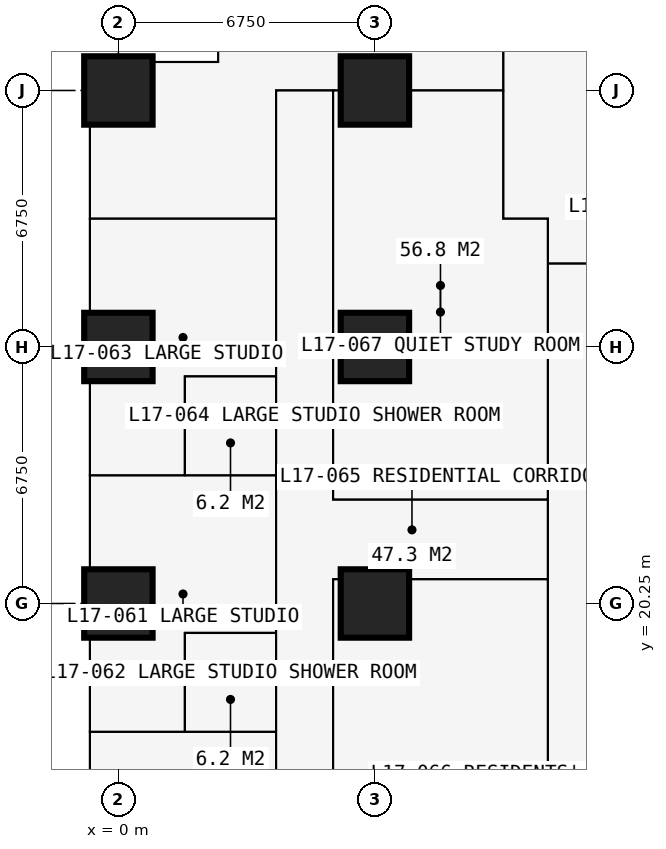
"""IFC4 building model, lengths in metres.
Left out: names, types, materials, properties, quantities, classifications, styles, units other than length and angle.
Written with IfcOpenShell. Run it as: python <this file> out.ifc"""

import sys

from ifc_helpers import new_model, si_unit, direction, frame, frame_2d, origin, origin_2d, place, context, subcontext, project, spatial, rectangle, extrude, element, fill, save


model = new_model("IFC4")
c1 = context("Model", 3, precision=1e-05, world=origin(), true_north=direction((0.0, 1.0)))
c2 = subcontext(c1, "Body", "Model", "MODEL_VIEW")
j1 = project(units=[si_unit("LENGTHUNIT", "METRE"), si_unit("PLANEANGLEUNIT", "RADIAN")], contexts=[c1])
p1 = place(None, origin())
s1 = spatial("IfcSite", under=j1, at=p1, CompositionType="ELEMENT")
p2 = place(p1, origin())
s2 = spatial("IfcBuilding", under=s1, at=p2, CompositionType="ELEMENT")
p3 = place(p2, frame((0.0, 0.0, 64.8)))
s3 = spatial("IfcBuildingStorey", under=s2, at=p3, CompositionType="ELEMENT", Elevation=64.8)
for number, where, z_axis, x_axis in (
    (1, (0.0, 20.25, 0.0), (0.0, 0.0, 1.0), (1.0, 0.0, 0.0)),
    (2, (0.0, 27.0, 0.0), (0.0, 0.0, 1.0), (1.0, 0.0, 0.0)),
    (3, (0.0, 33.75, 0.0), (0.0, 0.0, 1.0), (1.0, 0.0, 0.0)),
    (4, (6.75, 20.25, 0.0), (0.0, 0.0, 1.0), (1.0, 0.0, 0.0)),
    (5, (6.75, 27.0, 0.0), (0.0, 0.0, 1.0), (1.0, 0.0, 0.0)),
    (6, (6.75, 33.75, 0.0), (0.0, 0.0, 1.0), (1.0, 0.0, 0.0)),
):
    element("IfcColumn", number, at=place(p3, frame(where, z_axis=z_axis, x_axis=x_axis)), inside=s3, PredefinedType="COLUMN", context=c2, shape_type="SweptSolid", body=[
        extrude(rectangle(XDim=1.8, YDim=1.8, at=origin_2d()), origin(), (0.0, 0.0, 1.0), 3.6),
    ])
p4 = place(p3, frame((2.625, 37.875, 0.0), z_axis=(0.0, 0.0, 1.0), x_axis=(0.0, -1.0, 0.0)))
e7 = element("IfcWall", 7, at=p4, inside=s3, PredefinedType="SOLIDWALL", context=c2, shape_type="SweptSolid", body=[
    extrude(rectangle(XDim=3.375, YDim=0.3, at=frame_2d((1.688, 0.0))), origin(), (0.0, 0.0, 1.0), 3.375),
])
p5 = place(p4, frame((0.788, 0.0, 0.6)))
e8 = element("IfcOpeningElement", 8, at=p5, cuts=e7, PredefinedType="OPENING", context=c2, shape_type="SweptSolid", body=[
    extrude(rectangle(XDim=1.8, YDim=2.1, at=frame_2d((0.9, 1.05))), frame((0.0, 0.16, 0.0), z_axis=(0.0, -1.0, 0.0), x_axis=(1.0, 0.0, 0.0)), (0.0, 0.0, 1.0), 0.32),
])
p6 = place(p3, frame((2.625, 34.5, 0.0), z_axis=(0.0, 0.0, 1.0), x_axis=(-1.0, 0.0, 0.0)))
e9 = element("IfcWall", 9, at=p6, inside=s3, PredefinedType="SOLIDWALL", context=c2, shape_type="SweptSolid", body=[
    extrude(rectangle(XDim=3.375, YDim=0.3, at=frame_2d((1.688, 0.0))), origin(), (0.0, 0.0, 1.0), 3.375),
])
p7 = place(p6, frame((0.343, 0.0, 0.9)))
e10 = element("IfcOpeningElement", 10, at=p7, cuts=e9, PredefinedType="OPENING", context=c2, shape_type="SweptSolid", body=[
    extrude(rectangle(XDim=1.2, YDim=1.8, at=frame_2d((0.6, 0.9))), frame((0.0, 0.16, 0.0), z_axis=(0.0, -1.0, 0.0), x_axis=(1.0, 0.0, 0.0)), (0.0, 0.0, 1.0), 0.32),
])
p8 = place(p3, frame((-0.75, 20.25, 0.0), z_axis=(0.0, 0.0, 1.0), x_axis=(0.0, 1.0, 0.0)))
e11 = element("IfcWall", 11, at=p8, inside=s3, PredefinedType="SOLIDWALL", context=c2, shape_type="SweptSolid", body=[
    extrude(rectangle(XDim=6.75, YDim=0.15, at=frame_2d((3.375, 0.0))), origin(), (0.0, 0.0, 1.0), 3.375),
])
p9 = place(p8, frame((0.962, 0.0, 0.0)))
e12 = element("IfcOpeningElement", 12, at=p9, cuts=e11, PredefinedType="OPENING", context=c2, shape_type="SweptSolid", body=[
    extrude(rectangle(XDim=1.0, YDim=2.2, at=frame_2d((0.5, 1.1))), frame((0.0, 0.085, 0.0), z_axis=(0.0, -1.0, 0.0), x_axis=(1.0, 0.0, 0.0)), (0.0, 0.0, 1.0), 0.17),
])
p10 = place(p8, frame((2.025, 0.0, 0.9)))
e13 = element("IfcOpeningElement", 13, at=p10, cuts=e11, PredefinedType="OPENING", context=c2, shape_type="SweptSolid", body=[
    extrude(rectangle(XDim=1.2, YDim=1.8, at=frame_2d((0.6, 0.9))), frame((0.0, 0.085, 0.0), z_axis=(0.0, -1.0, 0.0), x_axis=(1.0, 0.0, 0.0)), (0.0, 0.0, 1.0), 0.17),
])
p11 = place(p8, frame((4.788, 0.0, 0.0)))
e14 = element("IfcOpeningElement", 14, at=p11, cuts=e11, PredefinedType="OPENING", context=c2, shape_type="SweptSolid", body=[
    extrude(rectangle(XDim=1.0, YDim=2.2, at=frame_2d((0.5, 1.1))), frame((0.0, 0.085, 0.0), z_axis=(0.0, -1.0, 0.0), x_axis=(1.0, 0.0, 0.0)), (0.0, 0.0, 1.0), 0.17),
])
p12 = place(p8, frame((3.525, 0.0, 0.9)))
e15 = element("IfcOpeningElement", 15, at=p12, cuts=e11, PredefinedType="OPENING", context=c2, shape_type="SweptSolid", body=[
    extrude(rectangle(XDim=1.2, YDim=1.8, at=frame_2d((0.6, 0.9))), frame((0.0, 0.085, 0.0), z_axis=(0.0, -1.0, 0.0), x_axis=(1.0, 0.0, 0.0)), (0.0, 0.0, 1.0), 0.17),
])
p13 = place(p3, frame((-0.85, 23.625, 0.0), z_axis=(0.0, 0.0, 1.0), x_axis=(-1.0, 0.0, 0.0)))
e16 = element("IfcWall", 16, at=p13, inside=s3, PredefinedType="USERDEFINED", context=c2, shape_type="SweptSolid", body=[
    extrude(rectangle(XDim=2.2, YDim=1.0, at=frame_2d((1.1, 0.0))), origin(), (0.0, 0.0, 1.0), 0.9),
])
p14 = place(p3, frame((-0.734, 16.875, 0.0), z_axis=(0.0, 0.0, 1.0), x_axis=(1.0, 0.0, 0.0)))
e17 = element("IfcWall", 17, at=p14, inside=s3, PredefinedType="PARTITIONING", context=c2, shape_type="SweptSolid", body=[
    extrude(rectangle(XDim=4.884, YDim=0.175, at=frame_2d((2.442, 0.0))), origin(), (0.0, 0.0, 1.0), 3.375),
])
p15 = place(p14, frame((3.234, 0.0, 0.0)))
e18 = element("IfcOpeningElement", 18, at=p15, cuts=e17, PredefinedType="OPENING", context=c2, shape_type="SweptSolid", body=[
    extrude(rectangle(XDim=0.9, YDim=2.2, at=frame_2d((0.45, 1.1))), frame((0.0, 0.097, 0.0), z_axis=(0.0, -1.0, 0.0), x_axis=(1.0, 0.0, 0.0)), (0.0, 0.0, 1.0), 0.195),
])
p16 = place(p3, frame((-0.734, 23.625, 0.0), z_axis=(0.0, 0.0, 1.0), x_axis=(1.0, 0.0, 0.0)))
e19 = element("IfcWall", 19, at=p16, inside=s3, PredefinedType="PARTITIONING", context=c2, shape_type="SweptSolid", body=[
    extrude(rectangle(XDim=4.884, YDim=0.175, at=frame_2d((2.442, 0.0))), origin(), (0.0, 0.0, 1.0), 3.375),
])
p17 = place(p16, frame((3.234, 0.0, 0.0)))
e20 = element("IfcOpeningElement", 20, at=p17, cuts=e19, PredefinedType="OPENING", context=c2, shape_type="SweptSolid", body=[
    extrude(rectangle(XDim=0.9, YDim=2.2, at=frame_2d((0.45, 1.1))), frame((0.0, 0.097, 0.0), z_axis=(0.0, -1.0, 0.0), x_axis=(1.0, 0.0, 0.0)), (0.0, 0.0, 1.0), 0.195),
])
p18 = place(p3, frame((-0.734, 30.375, 0.0), z_axis=(0.0, 0.0, 1.0), x_axis=(1.0, 0.0, 0.0)))
e21 = element("IfcWall", 21, at=p18, inside=s3, PredefinedType="PARTITIONING", context=c2, shape_type="SweptSolid", body=[
    extrude(rectangle(XDim=4.884, YDim=0.15, at=frame_2d((2.442, 0.0))), origin(), (0.0, 0.0, 1.0), 3.375),
])
p19 = place(p3, frame((1.75, 16.875, 0.0), z_axis=(0.0, 0.0, 1.0), x_axis=(0.0, 1.0, 0.0)))
e22 = element("IfcWall", 22, at=p19, inside=s3, PredefinedType="PARTITIONING", context=c2, shape_type="SweptSolid", body=[
    extrude(rectangle(XDim=2.6, YDim=0.1, at=frame_2d((1.3, 0.0))), origin(), (0.0, 0.0, 1.0), 3.375),
])
p20 = place(p3, frame((1.75, 19.475, 0.0), z_axis=(0.0, 0.0, 1.0), x_axis=(1.0, 0.0, 0.0)))
e23 = element("IfcWall", 23, at=p20, inside=s3, PredefinedType="PARTITIONING", context=c2, shape_type="SweptSolid", body=[
    extrude(rectangle(XDim=2.4, YDim=0.1, at=frame_2d((1.2, 0.0))), origin(), (0.0, 0.0, 1.0), 3.375),
])
p21 = place(p3, frame((1.75, 23.625, 0.0), z_axis=(0.0, 0.0, 1.0), x_axis=(0.0, 1.0, 0.0)))
e24 = element("IfcWall", 24, at=p21, inside=s3, PredefinedType="PARTITIONING", context=c2, shape_type="SweptSolid", body=[
    extrude(rectangle(XDim=2.6, YDim=0.1, at=frame_2d((1.3, 0.0))), origin(), (0.0, 0.0, 1.0), 3.375),
])
p22 = place(p3, frame((1.75, 26.225, 0.0), z_axis=(0.0, 0.0, 1.0), x_axis=(1.0, 0.0, 0.0)))
e25 = element("IfcWall", 25, at=p22, inside=s3, PredefinedType="PARTITIONING", context=c2, shape_type="SweptSolid", body=[
    extrude(rectangle(XDim=2.4, YDim=0.1, at=frame_2d((1.2, 0.0))), origin(), (0.0, 0.0, 1.0), 3.375),
])
p23 = place(p3, frame((4.15, 10.125, 0.0), z_axis=(0.0, 0.0, 1.0), x_axis=(0.0, 1.0, 0.0)))
e26 = element("IfcWall", 26, at=p23, inside=s3, PredefinedType="PARTITIONING", context=c2, shape_type="SweptSolid", body=[
    extrude(rectangle(XDim=23.625, YDim=0.15, at=frame_2d((11.812, 0.0))), origin(), (0.0, 0.0, 1.0), 3.375),
])
p24 = place(p23, frame((4.2, 0.0, 0.0)))
e27 = element("IfcOpeningElement", 27, at=p24, cuts=e26, PredefinedType="OPENING", context=c2, shape_type="SweptSolid", body=[
    extrude(rectangle(XDim=0.95, YDim=2.2, at=frame_2d((0.475, 1.1))), frame((0.0, 0.085, 0.0), z_axis=(0.0, -1.0, 0.0), x_axis=(1.0, 0.0, 0.0)), (0.0, 0.0, 1.0), 0.17),
])
p25 = place(p23, frame((10.95, 0.0, 0.0)))
e28 = element("IfcOpeningElement", 28, at=p25, cuts=e26, PredefinedType="OPENING", context=c2, shape_type="SweptSolid", body=[
    extrude(rectangle(XDim=0.95, YDim=2.2, at=frame_2d((0.475, 1.1))), frame((0.0, 0.085, 0.0), z_axis=(0.0, -1.0, 0.0), x_axis=(1.0, 0.0, 0.0)), (0.0, 0.0, 1.0), 0.17),
])
p26 = place(p23, frame((17.7, 0.0, 0.0)))
e29 = element("IfcOpeningElement", 29, at=p26, cuts=e26, PredefinedType="OPENING", context=c2, shape_type="SweptSolid", body=[
    extrude(rectangle(XDim=0.95, YDim=2.2, at=frame_2d((0.475, 1.1))), frame((0.0, 0.085, 0.0), z_axis=(0.0, -1.0, 0.0), x_axis=(1.0, 0.0, 0.0)), (0.0, 0.0, 1.0), 0.17),
])
p27 = place(p3, frame((4.15, 33.75, 0.0), z_axis=(0.0, 0.0, 1.0), x_axis=(1.0, 0.0, 0.0)))
e30 = element("IfcWall", 30, at=p27, inside=s3, PredefinedType="PARTITIONING", context=c2, shape_type="SweptSolid", body=[
    extrude(rectangle(XDim=5.975, YDim=0.15, at=frame_2d((2.988, 0.0))), origin(), (0.0, 0.0, 1.0), 2.877),
])
p28 = place(p3, frame((5.65, 10.125, 0.0), z_axis=(0.0, 0.0, 1.0), x_axis=(0.0, 1.0, 0.0)))
e31 = element("IfcWall", 31, at=p28, inside=s3, PredefinedType="PARTITIONING", context=c2, shape_type="SweptSolid", body=[
    extrude(rectangle(XDim=10.762, YDim=0.15, at=frame_2d((5.381, 0.0))), origin(), (0.0, 0.0, 1.0), 3.375),
])
p29 = place(p28, frame((4.9, 0.0, 0.0)))
e32 = element("IfcOpeningElement", 32, at=p29, cuts=e31, PredefinedType="OPENING", context=c2, shape_type="SweptSolid", body=[
    extrude(rectangle(XDim=0.95, YDim=2.2, at=frame_2d((0.475, 1.1))), frame((0.0, 0.085, 0.0), z_axis=(0.0, -1.0, 0.0), x_axis=(1.0, 0.0, 0.0)), (0.0, 0.0, 1.0), 0.17),
])
p30 = place(p3, frame((5.65, 20.887, 0.0), z_axis=(0.0, 0.0, 1.0), x_axis=(1.0, 0.0, 0.0)))
e33 = element("IfcWall", 33, at=p30, inside=s3, PredefinedType="PARTITIONING", context=c2, shape_type="SweptSolid", body=[
    extrude(rectangle(XDim=5.65, YDim=0.15, at=frame_2d((2.825, 0.0))), origin(), (0.0, 0.0, 1.0), 3.375),
])
p31 = place(p3, frame((5.65, 22.988, 0.0), z_axis=(0.0, 0.0, 1.0), x_axis=(0.0, 1.0, 0.0)))
e34 = element("IfcWall", 34, at=p31, inside=s3, PredefinedType="PARTITIONING", context=c2, shape_type="SweptSolid", body=[
    extrude(rectangle(XDim=10.762, YDim=0.15, at=frame_2d((5.381, 0.0))), origin(), (0.0, 0.0, 1.0), 3.375),
])
p32 = place(p31, frame((4.95, 0.0, 0.0)))
e35 = element("IfcOpeningElement", 35, at=p32, cuts=e34, PredefinedType="OPENING", context=c2, shape_type="SweptSolid", body=[
    extrude(rectangle(XDim=0.95, YDim=2.2, at=frame_2d((0.475, 1.1))), frame((0.0, 0.085, 0.0), z_axis=(0.0, -1.0, 0.0), x_axis=(1.0, 0.0, 0.0)), (0.0, 0.0, 1.0), 0.17),
])
p33 = place(p3, frame((5.65, 22.988, 0.0), z_axis=(0.0, 0.0, 1.0), x_axis=(1.0, 0.0, 0.0)))
e36 = element("IfcWall", 36, at=p33, inside=s3, PredefinedType="PARTITIONING", context=c2, shape_type="SweptSolid", body=[
    extrude(rectangle(XDim=5.65, YDim=0.15, at=frame_2d((2.825, 0.0))), origin(), (0.0, 0.0, 1.0), 3.375),
])
p34 = place(p3, frame((10.125, 30.375, 0.0), z_axis=(0.0, 0.0, 1.0), x_axis=(0.0, 1.0, 0.0)))
e37 = element("IfcWall", 37, at=p34, inside=s3, PredefinedType="PARTITIONING", context=c2, shape_type="SweptSolid", body=[
    extrude(rectangle(XDim=10.859, YDim=0.15, at=frame_2d((5.429, 0.0))), origin(), (0.0, 0.0, 1.0), 3.375),
])
p35 = place(p34, frame((4.725, 0.0, 0.0)))
e38 = element("IfcOpeningElement", 38, at=p35, cuts=e37, PredefinedType="OPENING", context=c2, shape_type="SweptSolid", body=[
    extrude(rectangle(XDim=1.0, YDim=2.2, at=frame_2d((0.5, 1.1))), frame((0.0, 0.085, 0.0), z_axis=(0.0, -1.0, 0.0), x_axis=(1.0, 0.0, 0.0)), (0.0, 0.0, 1.0), 0.17),
])
p36 = place(p3, frame((10.125, 30.375, 0.0), z_axis=(0.0, 0.0, 1.0), x_axis=(1.0, 0.0, 0.0)))
e39 = element("IfcWall", 39, at=p36, inside=s3, PredefinedType="PARTITIONING", context=c2, shape_type="SweptSolid", body=[
    extrude(rectangle(XDim=1.175, YDim=0.15, at=frame_2d((0.587, 0.0))), origin(), (0.0, 0.0, 1.0), 3.375),
])
p37 = place(p3, frame((11.3, 11.3, 0.0), z_axis=(0.0, 0.0, 1.0), x_axis=(0.0, 1.0, 0.0)))
e40 = element("IfcWall", 40, at=p37, inside=s3, PredefinedType="PARTITIONING", context=c2, shape_type="SweptSolid", body=[
    extrude(rectangle(XDim=19.075, YDim=0.15, at=frame_2d((9.538, 0.0))), origin(), (0.0, 0.0, 1.0), 3.375),
])
p38 = place(p37, frame((10.137, 0.0, 0.0)))
e41 = element("IfcOpeningElement", 41, at=p38, cuts=e40, PredefinedType="OPENING", context=c2, shape_type="SweptSolid", body=[
    extrude(rectangle(XDim=1.0, YDim=2.2, at=frame_2d((0.5, 1.1))), frame((0.0, 0.085, 0.0), z_axis=(0.0, -1.0, 0.0), x_axis=(1.0, 0.0, 0.0)), (0.0, 0.0, 1.0), 0.17),
])
p39 = place(p3, frame((11.3, 29.2, 0.0), z_axis=(0.0, 0.0, 1.0), x_axis=(1.0, 0.0, 0.0)))
e42 = element("IfcWall", 42, at=p39, inside=s3, PredefinedType="PARTITIONING", context=c2, shape_type="SweptSolid", body=[
    extrude(rectangle(XDim=19.075, YDim=0.15, at=frame_2d((9.538, 0.0))), origin(), (0.0, 0.0, 1.0), 3.375),
])
p40 = place(p39, frame((10.137, 0.0, 0.0)))
e43 = element("IfcOpeningElement", 43, at=p40, cuts=e42, PredefinedType="OPENING", context=c2, shape_type="SweptSolid", body=[
    extrude(rectangle(XDim=1.0, YDim=2.2, at=frame_2d((0.5, 1.1))), frame((0.0, 0.085, 0.0), z_axis=(0.0, -1.0, 0.0), x_axis=(1.0, 0.0, 0.0)), (0.0, 0.0, 1.0), 0.17),
])
p41 = place(p7, origin())
e44 = element("IfcWindow", 44, at=p41, inside=s3, PartitioningType="SINGLE_PANEL", PredefinedType="WINDOW", context=c2, shape_type="SweptSolid", body=[
    extrude(rectangle(XDim=1.2, YDim=1.8, at=frame_2d((0.6, 0.9))), frame((0.0, 0.03, 0.0), z_axis=(0.0, -1.0, 0.0), x_axis=(1.0, 0.0, 0.0)), (0.0, 0.0, 1.0), 0.06),
])
fill(e10, e44)
p42 = place(p9, origin())
e45 = element("IfcDoor", 45, at=p42, inside=s3, OperationType="SINGLE_SWING_LEFT", PredefinedType="DOOR", context=c2, shape_type="SweptSolid", body=[
    extrude(rectangle(XDim=1.0, YDim=2.2, at=frame_2d((0.5, 1.1))), frame((0.0, 0.025, 0.0), z_axis=(0.0, -1.0, 0.0), x_axis=(1.0, 0.0, 0.0)), (0.0, 0.0, 1.0), 0.05),
])
fill(e12, e45)
p43 = place(p10, origin())
e46 = element("IfcWindow", 46, at=p43, inside=s3, PartitioningType="SINGLE_PANEL", PredefinedType="WINDOW", context=c2, shape_type="SweptSolid", body=[
    extrude(rectangle(XDim=1.2, YDim=1.8, at=frame_2d((0.6, 0.9))), frame((0.0, 0.03, 0.0), z_axis=(0.0, -1.0, 0.0), x_axis=(1.0, 0.0, 0.0)), (0.0, 0.0, 1.0), 0.06),
])
fill(e13, e46)
p44 = place(p11, origin())
e47 = element("IfcDoor", 47, at=p44, inside=s3, OperationType="SINGLE_SWING_RIGHT", PredefinedType="DOOR", context=c2, shape_type="SweptSolid", body=[
    extrude(rectangle(XDim=1.0, YDim=2.2, at=frame_2d((0.5, 1.1))), frame((0.0, 0.025, 0.0), z_axis=(0.0, -1.0, 0.0), x_axis=(1.0, 0.0, 0.0)), (0.0, 0.0, 1.0), 0.05),
])
fill(e14, e47)
p45 = place(p12, origin())
e48 = element("IfcWindow", 48, at=p45, inside=s3, PartitioningType="SINGLE_PANEL", PredefinedType="WINDOW", context=c2, shape_type="SweptSolid", body=[
    extrude(rectangle(XDim=1.2, YDim=1.8, at=frame_2d((0.6, 0.9))), frame((0.0, 0.03, 0.0), z_axis=(0.0, -1.0, 0.0), x_axis=(1.0, 0.0, 0.0)), (0.0, 0.0, 1.0), 0.06),
])
fill(e15, e48)
p46 = place(p25, origin())
e49 = element("IfcDoor", 49, at=p46, inside=s3, OperationType="SINGLE_SWING_LEFT", PredefinedType="DOOR", context=c2, shape_type="SweptSolid", body=[
    extrude(rectangle(XDim=0.95, YDim=2.2, at=frame_2d((0.475, 1.1))), frame((0.0, 0.025, 0.0), z_axis=(0.0, -1.0, 0.0), x_axis=(1.0, 0.0, 0.0)), (0.0, 0.0, 1.0), 0.05),
])
fill(e28, e49)
p47 = place(p15, origin())
e50 = element("IfcDoor", 50, at=p47, inside=s3, OperationType="SINGLE_SWING_RIGHT", PredefinedType="DOOR", context=c2, shape_type="SweptSolid", body=[
    extrude(rectangle(XDim=0.9, YDim=2.2, at=frame_2d((0.45, 1.1))), frame((0.0, 0.025, 0.0), z_axis=(0.0, -1.0, 0.0), x_axis=(1.0, 0.0, 0.0)), (0.0, 0.0, 1.0), 0.05),
])
fill(e18, e50)
p48 = place(p26, origin())
e51 = element("IfcDoor", 51, at=p48, inside=s3, OperationType="SINGLE_SWING_LEFT", PredefinedType="DOOR", context=c2, shape_type="SweptSolid", body=[
    extrude(rectangle(XDim=0.95, YDim=2.2, at=frame_2d((0.475, 1.1))), frame((0.0, 0.025, 0.0), z_axis=(0.0, -1.0, 0.0), x_axis=(1.0, 0.0, 0.0)), (0.0, 0.0, 1.0), 0.05),
])
fill(e29, e51)
p49 = place(p17, origin())
e52 = element("IfcDoor", 52, at=p49, inside=s3, OperationType="SINGLE_SWING_RIGHT", PredefinedType="DOOR", context=c2, shape_type="SweptSolid", body=[
    extrude(rectangle(XDim=0.9, YDim=2.2, at=frame_2d((0.45, 1.1))), frame((0.0, 0.025, 0.0), z_axis=(0.0, -1.0, 0.0), x_axis=(1.0, 0.0, 0.0)), (0.0, 0.0, 1.0), 0.05),
])
fill(e20, e52)
p50 = place(p38, origin())
e53 = element("IfcDoor", 53, at=p50, inside=s3, OperationType="SINGLE_SWING_LEFT", PredefinedType="DOOR", context=c2, shape_type="SweptSolid", body=[
    extrude(rectangle(XDim=1.0, YDim=2.2, at=frame_2d((0.5, 1.1))), frame((0.0, 0.025, 0.0), z_axis=(0.0, -1.0, 0.0), x_axis=(1.0, 0.0, 0.0)), (0.0, 0.0, 1.0), 0.05),
])
fill(e41, e53)
p51 = place(p29, origin())
e54 = element("IfcDoor", 54, at=p51, inside=s3, OperationType="SINGLE_SWING_LEFT", PredefinedType="DOOR", context=c2, shape_type="SweptSolid", body=[
    extrude(rectangle(XDim=0.95, YDim=2.2, at=frame_2d((0.475, 1.1))), frame((0.0, 0.025, 0.0), z_axis=(0.0, -1.0, 0.0), x_axis=(1.0, 0.0, 0.0)), (0.0, 0.0, 1.0), 0.05),
])
fill(e32, e54)
p52 = place(p32, origin())
e55 = element("IfcDoor", 55, at=p52, inside=s3, OperationType="SINGLE_SWING_LEFT", PredefinedType="DOOR", context=c2, shape_type="SweptSolid", body=[
    extrude(rectangle(XDim=0.95, YDim=2.2, at=frame_2d((0.475, 1.1))), frame((0.0, 0.025, 0.0), z_axis=(0.0, -1.0, 0.0), x_axis=(1.0, 0.0, 0.0)), (0.0, 0.0, 1.0), 0.05),
])
fill(e35, e55)
save(model, sys.argv[1])
